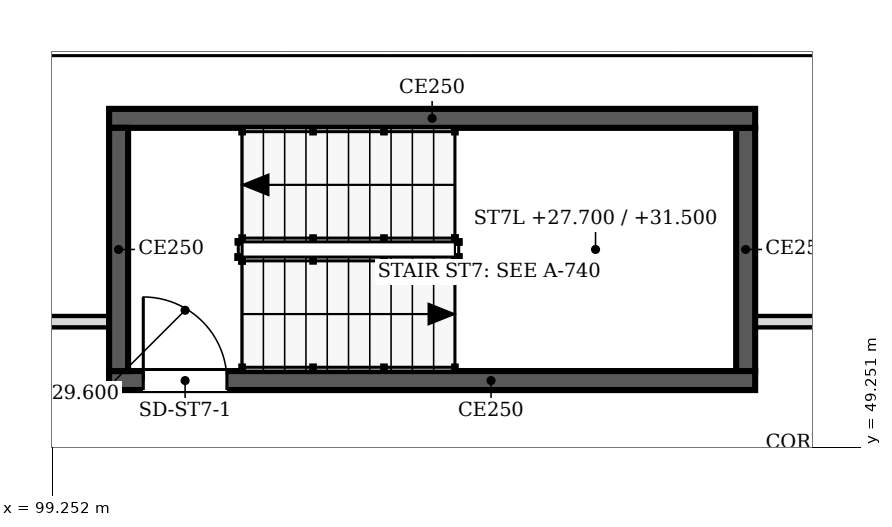
"""IFC4 building model, lengths in metres.
Left out: names, types, materials, properties, quantities, classifications, styles, units other than length and angle.
Written with IfcOpenShell. Run it as: python <this file> out.ifc"""

import sys

from ifc_helpers import new_model, si_unit, direction, frame, frame_2d, origin, place, context, subcontext, project, spatial, polyline, rectangle, outline, extrude, faceted_brep, source, transform, mapped, element, fill, save


model = new_model("IFC4")
c1 = context("Model", 3, precision=1e-05, world=origin(), true_north=direction((0.0, 1.0)))
c2 = subcontext(c1, "Body", "Model", "MODEL_VIEW")
j1 = project(units=[si_unit("LENGTHUNIT", "METRE"), si_unit("PLANEANGLEUNIT", "RADIAN")], contexts=[c1])
p1 = place(None, origin())
s1 = spatial("IfcSite", under=j1, at=p1, CompositionType="ELEMENT")
p2 = place(p1, origin())
s2 = spatial("IfcBuilding", under=s1, at=p2, CompositionType="ELEMENT")
p3 = place(p2, frame((0.0, 0.0, 25.8)))
s3 = spatial("IfcBuildingStorey", under=s2, at=p3, CompositionType="ELEMENT", Elevation=25.8)
m1 = source(origin(), c2, "Body", "SweptSolid", [
    extrude(outline(polyline([(6.1, 0.0), (3.05, 3.8), (0.0, 0.0), (6.1, 0.0)])), frame((0.0, 0.25, 0.0), z_axis=(0.0, -1.0, 0.0), x_axis=(1.0, 0.0, 0.0)), (0.0, 0.0, 1.0), 0.5),
])
p4 = place(p3, frame((112.85, 54.65, 0.0), z_axis=(0.0, 0.0, 1.0), x_axis=(-1.0, 0.0, 0.0)))
e1 = element("IfcWall", 1, at=p4, inside=s3, PredefinedType="SOLIDWALL", context=c2, shape_type="MappedRepresentation", body=[
    mapped(m1, transform((0.0, 0.0, 0.0), scale=1.0)),
])
m2 = source(origin(), c2, "Body", "SweptSolid", [
    extrude(outline(polyline([(5.579, 0.25), (3.05, 3.401), (0.521, 0.25), (5.579, 0.25)])), frame((0.0, 0.26, 0.0), z_axis=(0.0, -1.0, 0.0), x_axis=(1.0, 0.0, 0.0)), (0.0, 0.0, 1.0), 0.52),
])
p5 = place(p4, origin())
e2 = element("IfcOpeningElement", 2, at=p5, cuts=e1, PredefinedType="OPENING", context=c2, shape_type="MappedRepresentation", body=[
    mapped(m2, transform((0.0, 0.0, 0.0), scale=1.0)),
])
p6 = place(p3, frame((106.75, 54.65, 0.0), z_axis=(0.0, 0.0, 1.0), x_axis=(-1.0, 0.0, 0.0)))
e3 = element("IfcWall", 3, at=p6, inside=s3, PredefinedType="SOLIDWALL", context=c2, shape_type="MappedRepresentation", body=[
    mapped(m1, transform((0.0, 0.0, 0.0), scale=1.0)),
])
p7 = place(p6, origin())
e4 = element("IfcOpeningElement", 4, at=p7, cuts=e3, PredefinedType="OPENING", context=c2, shape_type="MappedRepresentation", body=[
    mapped(m2, transform((0.0, 0.0, 0.0), scale=1.0)),
])
m3 = source(origin(), c2, "Body", "Brep", [
    faceted_brep([(6.1, -0.25, 0.0), (3.05, -0.25, 3.8), (0.0, -0.25, 0.0), (6.1, -0.25, 0.0), (0.0, 0.25, 0.0), (3.05, 0.25, 3.8), (6.1, 0.25, 0.0), (6.1, 0.25, 0.0)], [[[0, 1, 2, 3]], [[4, 5, 6, 7]], [[6, 5, 1, 0]], [[5, 4, 2, 1]], [[4, 7, 3, 2]], [[3, 7, 6, 0]]]),
])
p8 = place(p3, frame((100.65, 54.65, 0.0), z_axis=(0.0, 0.0, 1.0), x_axis=(-1.0, 0.0, 0.0)))
e5 = element("IfcWall", 5, at=p8, inside=s3, PredefinedType="SOLIDWALL", context=c2, shape_type="MappedRepresentation", body=[
    mapped(m3, transform((0.0, 0.0, 0.0), scale=1.0)),
])
p9 = place(p8, origin())
e6 = element("IfcOpeningElement", 6, at=p9, cuts=e5, PredefinedType="OPENING", context=c2, shape_type="MappedRepresentation", body=[
    mapped(m2, transform((0.0, 0.0, 0.0), scale=1.0)),
])
p10 = place(p2, frame((0.0, 0.0, 29.6)))
s4 = spatial("IfcBuildingStorey", under=s2, at=p10, CompositionType="ELEMENT", Elevation=29.6)
m4 = source(origin(), c2, "Body", "SweptSolid", [
    extrude(outline(polyline([(3.05, 0.0), (6.1, 3.8), (3.05, 7.6), (0.0, 3.8), (3.05, 0.0)])), frame((0.0, 0.25, 0.0), z_axis=(0.0, -1.0, 0.0), x_axis=(1.0, 0.0, 0.0)), (0.0, 0.0, 1.0), 0.5),
])
p11 = place(p10, frame((109.8, 54.65, -3.8), z_axis=(0.0, 0.0, 1.0), x_axis=(-1.0, 0.0, 0.0)))
e7 = element("IfcWall", 7, at=p11, inside=s4, PredefinedType="SOLIDWALL", context=c2, shape_type="MappedRepresentation", body=[
    mapped(m4, transform((0.0, 0.0, 0.0), scale=1.0)),
])
m5 = source(origin(), c2, "Body", "SweptSolid", [
    extrude(outline(polyline([(3.05, 0.399), (5.78, 3.8), (3.05, 7.2), (0.321, 3.8), (3.05, 0.399)])), frame((0.0, 0.26, 0.0), z_axis=(0.0, -1.0, 0.0), x_axis=(1.0, 0.0, 0.0)), (0.0, 0.0, 1.0), 0.52),
])
p12 = place(p11, origin())
e8 = element("IfcOpeningElement", 8, at=p12, cuts=e7, PredefinedType="OPENING", context=c2, shape_type="MappedRepresentation", body=[
    mapped(m5, transform((0.0, 0.0, 0.0), scale=1.0)),
])
m6 = source(origin(), c2, "Body", "Brep", [
    faceted_brep([(3.05, -0.25, 0.0), (6.1, -0.25, 3.8), (6.1, -0.25, 3.8), (3.05, -0.25, 7.6), (0.0, -0.25, 3.8), (0.0, 0.25, 3.8), (3.05, 0.25, 7.6), (6.1, 0.25, 3.8), (6.1, 0.25, 3.8), (3.05, 0.25, 0.0)], [[[0, 1, 2, 3, 4]], [[5, 6, 7, 8, 9]], [[9, 8, 1, 0]], [[7, 6, 3, 2]], [[6, 5, 4, 3]], [[5, 9, 0, 4]], [[1, 8, 7, 2]]]),
])
p13 = place(p10, frame((103.7, 54.65, -3.8), z_axis=(0.0, 0.0, 1.0), x_axis=(-1.0, 0.0, 0.0)))
e9 = element("IfcWall", 9, at=p13, inside=s4, PredefinedType="SOLIDWALL", context=c2, shape_type="MappedRepresentation", body=[
    mapped(m6, transform((0.0, 0.0, 0.0), scale=1.0)),
])
p14 = place(p13, origin())
e10 = element("IfcOpeningElement", 10, at=p14, cuts=e9, PredefinedType="OPENING", context=c2, shape_type="MappedRepresentation", body=[
    mapped(m5, transform((0.0, 0.0, 0.0), scale=1.0)),
])
p15 = place(p3, frame((108.5, 50.125, 0.0), z_axis=(0.0, 0.0, 1.0), x_axis=(-1.0, 0.0, 0.0)))
e11 = element("IfcWall", 11, at=p15, inside=s3, PredefinedType="SOLIDWALL", context=c2, shape_type="SweptSolid", body=[
    extrude(rectangle(XDim=8.5, YDim=0.25, at=frame_2d((4.25, 0.0))), origin(), (0.0, 0.0, 1.0), 3.8),
])
m7 = source(origin(), c2, "Body", "SweptSolid", [
    extrude(rectangle(XDim=1.1, YDim=2.1, at=frame_2d((0.55, 1.05))), frame((0.0, 0.135, 0.0), z_axis=(0.0, -1.0, 0.0), x_axis=(1.0, 0.0, 0.0)), (0.0, 0.0, 1.0), 0.27),
])
p16 = place(p15, frame((6.95, 0.0, 0.0)))
e12 = element("IfcOpeningElement", 12, at=p16, cuts=e11, PredefinedType="OPENING", context=c2, shape_type="MappedRepresentation", body=[
    mapped(m7, transform((0.0, 0.0, 0.0), scale=1.0)),
])
p17 = place(p3, frame((100.125, 50.25, 0.0), z_axis=(0.0, 0.0, 1.0), x_axis=(0.0, 1.0, 0.0)))
e13 = element("IfcWall", 13, at=p17, inside=s3, PredefinedType="SOLIDWALL", context=c2, shape_type="SweptSolid", body=[
    extrude(rectangle(XDim=3.2, YDim=0.25, at=frame_2d((1.6, 0.0))), origin(), (0.0, 0.0, 1.0), 3.8),
])
p18 = place(p3, frame((100.0, 53.575, 0.0), z_axis=(0.0, 0.0, 1.0), x_axis=(1.0, 0.0, 0.0)))
e14 = element("IfcWall", 14, at=p18, inside=s3, PredefinedType="SOLIDWALL", context=c2, shape_type="SweptSolid", body=[
    extrude(rectangle(XDim=8.5, YDim=0.25, at=frame_2d((4.25, 0.0))), origin(), (0.0, 0.0, 1.0), 3.8),
])
p19 = place(p3, frame((108.375, 53.45, 0.0), z_axis=(0.0, 0.0, 1.0), x_axis=(0.0, -1.0, 0.0)))
e15 = element("IfcWall", 15, at=p19, inside=s3, PredefinedType="SOLIDWALL", context=c2, shape_type="SweptSolid", body=[
    extrude(rectangle(XDim=3.2, YDim=0.25, at=frame_2d((1.6, 0.0))), origin(), (0.0, 0.0, 1.0), 3.8),
])
p20 = place(p3, frame((95.576, 50.9, 0.0), z_axis=(0.0, 0.0, 1.0), x_axis=(1.0, 0.0, 0.0)))
e16 = element("IfcWall", 16, at=p20, inside=s3, PredefinedType="PARTITIONING", context=c2, shape_type="SweptSolid", body=[
    extrude(rectangle(XDim=4.424, YDim=0.15, at=frame_2d((2.212, 0.0))), origin(), (0.0, 0.0, 1.0), 3.067),
])
p21 = place(p3, frame((108.5, 50.9, 0.0), z_axis=(0.0, 0.0, 1.0), x_axis=(1.0, 0.0, 0.0)))
e17 = element("IfcWall", 17, at=p21, inside=s3, PredefinedType="PARTITIONING", context=c2, shape_type="SweptSolid", body=[
    extrude(rectangle(XDim=15.6, YDim=0.15, at=frame_2d((7.8, 0.0))), origin(), (0.0, 0.0, 1.0), 3.067),
])
m8 = source(origin(), c2, "Body", "SweptSolid", [
    extrude(rectangle(XDim=1.0, YDim=2.1, at=frame_2d((0.5, 1.05))), frame((0.0, 0.085, 0.0), z_axis=(0.0, -1.0, 0.0), x_axis=(1.0, 0.0, 0.0)), (0.0, 0.0, 1.0), 0.17),
])
p22 = place(p21, frame((7.3, 0.0, 0.0)))
e18 = element("IfcOpeningElement", 18, at=p22, cuts=e17, PredefinedType="OPENING", context=c2, shape_type="MappedRepresentation", body=[
    mapped(m8, transform((0.0, 0.0, 0.0), scale=1.0)),
])
m9 = source(origin(), c2, "Body", "SweptSolid", [
    extrude(rectangle(XDim=1.1, YDim=2.1, at=frame_2d((0.55, 1.05))), frame((0.0, 0.025, 0.0), z_axis=(0.0, -1.0, 0.0), x_axis=(1.0, 0.0, 0.0)), (0.0, 0.0, 1.0), 0.05),
])
p23 = place(p16, origin())
e19 = element("IfcDoor", 19, at=p23, inside=s3, OperationType="SINGLE_SWING_RIGHT", PredefinedType="DOOR", context=c2, shape_type="MappedRepresentation", body=[
    mapped(m9, transform((0.0, 0.0, 0.0), scale=1.0)),
])
fill(e12, e19)
save(model, sys.argv[1])
